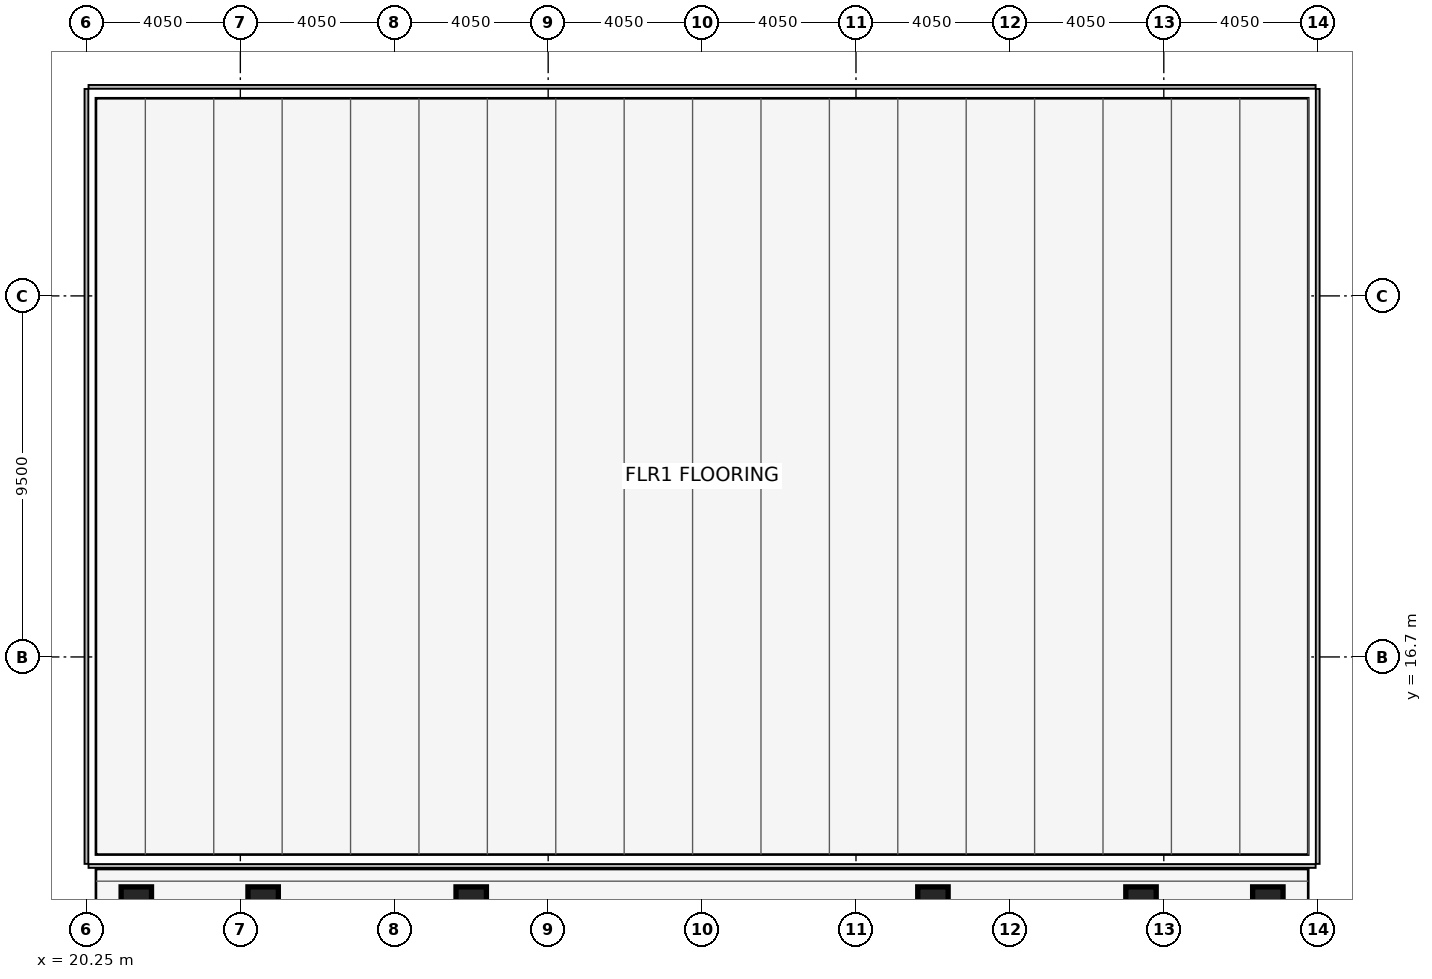
"""IFC4 building model, lengths in metres.
Left out: names, types, materials, properties, quantities, classifications, styles, units other than length and angle.
Written with IfcOpenShell. Run it as: python <this file> out.ifc"""

import sys

from ifc_helpers import new_model, si_unit, direction, frame, frame_2d, origin, origin_2d, place, context, subcontext, project, spatial, rectangle, hollow_rectangle, extrude, element, fill, save


model = new_model("IFC4")
c1 = context("Model", 3, precision=1e-05, world=origin(), true_north=direction((0.0, 1.0)))
c2 = subcontext(c1, "Body", "Model", "MODEL_VIEW")
j1 = project(units=[si_unit("LENGTHUNIT", "METRE"), si_unit("PLANEANGLEUNIT", "RADIAN")], contexts=[c1])
p1 = place(None, origin())
s1 = spatial("IfcSite", under=j1, at=p1, CompositionType="ELEMENT")
p2 = place(p1, origin())
s2 = spatial("IfcBuilding", under=s1, at=p2, CompositionType="ELEMENT")
p3 = place(p2, origin())
s3 = spatial("IfcBuildingStorey", under=s2, at=p3, CompositionType="ELEMENT", Elevation=0.0)
for number, where, z_axis, x_axis in (
    (1, (21.562, 10.15, 0.0), (0.0, 0.0, 1.0), (1.0, 0.0, 0.0)),
    (2, (24.9, 10.15, 0.0), (0.0, 0.0, 1.0), (1.0, 0.0, 0.0)),
    (3, (30.375, 10.15, 0.0), (0.0, 0.0, 1.0), (1.0, 0.0, 0.0)),
    (4, (42.525, 10.15, 0.0), (0.0, 0.0, 1.0), (1.0, 0.0, 0.0)),
    (5, (48.0, 10.15, 0.0), (0.0, 0.0, 1.0), (1.0, 0.0, 0.0)),
    (6, (51.337, 10.15, 0.0), (0.0, 0.0, 1.0), (1.0, 0.0, 0.0)),
):
    element("IfcColumn", number, at=place(p3, frame(where, z_axis=z_axis, x_axis=x_axis)), inside=s3, PredefinedType="COLUMN", context=c2, shape_type="SweptSolid", body=[
        extrude(hollow_rectangle(XDim=0.8, YDim=1.0, WallThickness=0.055, at=origin_2d()), origin(), (0.0, 0.0, 1.0), 5.4),
    ])
p4 = place(p3, frame((20.305, 11.2, 0.0), z_axis=(0.0, 0.0, 1.0), x_axis=(1.0, 0.0, 0.0)))
e7 = element("IfcWall", 7, at=p4, inside=s3, PredefinedType="MOVABLE", context=c2, shape_type="SweptSolid", body=[
    extrude(rectangle(XDim=32.29, YDim=0.1, at=frame_2d((16.145, 0.0))), origin(), (0.0, 0.0, 1.0), 4.29),
])
p5 = place(p4, frame((6.5, 0.0, 0.0)))
e8 = element("IfcOpeningElement", 8, at=p5, cuts=e7, PredefinedType="OPENING", context=c2, shape_type="SweptSolid", body=[
    extrude(rectangle(XDim=1.6, YDim=2.15, at=frame_2d((0.8, 1.075))), frame((0.0, 0.06, 0.0), z_axis=(0.0, -1.0, 0.0), x_axis=(1.0, 0.0, 0.0)), (0.0, 0.0, 1.0), 0.12),
])
p6 = place(p4, frame((15.4, 0.0, 0.0)))
e9 = element("IfcOpeningElement", 9, at=p6, cuts=e7, PredefinedType="OPENING", context=c2, shape_type="SweptSolid", body=[
    extrude(rectangle(XDim=1.6, YDim=2.15, at=frame_2d((0.8, 1.075))), frame((0.0, 0.06, 0.0), z_axis=(0.0, -1.0, 0.0), x_axis=(1.0, 0.0, 0.0)), (0.0, 0.0, 1.0), 0.12),
])
p7 = place(p4, frame((24.3, 0.0, 0.0)))
e10 = element("IfcOpeningElement", 10, at=p7, cuts=e7, PredefinedType="OPENING", context=c2, shape_type="SweptSolid", body=[
    extrude(rectangle(XDim=1.6, YDim=2.15, at=frame_2d((0.8, 1.075))), frame((0.0, 0.06, 0.0), z_axis=(0.0, -1.0, 0.0), x_axis=(1.0, 0.0, 0.0)), (0.0, 0.0, 1.0), 0.12),
])
p8 = place(p3, frame((20.305, 31.7, 0.0), z_axis=(0.0, 0.0, 1.0), x_axis=(1.0, 0.0, 0.0)))
e11 = element("IfcWall", 11, at=p8, inside=s3, PredefinedType="MOVABLE", context=c2, shape_type="SweptSolid", body=[
    extrude(rectangle(XDim=32.29, YDim=0.1, at=frame_2d((16.145, 0.0))), origin(), (0.0, 0.0, 1.0), 4.29),
])
p9 = place(p8, frame((7.2, 0.0, 0.0)))
e12 = element("IfcOpeningElement", 12, at=p9, cuts=e11, PredefinedType="OPENING", context=c2, shape_type="SweptSolid", body=[
    extrude(rectangle(XDim=1.6, YDim=2.15, at=frame_2d((0.8, 1.075))), frame((0.0, 0.06, 0.0), z_axis=(0.0, -1.0, 0.0), x_axis=(1.0, 0.0, 0.0)), (0.0, 0.0, 1.0), 0.12),
])
p10 = place(p8, frame((23.6, 0.0, 0.0)))
e13 = element("IfcOpeningElement", 13, at=p10, cuts=e11, PredefinedType="OPENING", context=c2, shape_type="SweptSolid", body=[
    extrude(rectangle(XDim=1.6, YDim=2.15, at=frame_2d((0.8, 1.075))), frame((0.0, 0.06, 0.0), z_axis=(0.0, -1.0, 0.0), x_axis=(1.0, 0.0, 0.0)), (0.0, 0.0, 1.0), 0.12),
])
for number, where, z_axis, x_axis in (
    (14, (20.25, 11.255, 0.0), (0.0, 0.0, 1.0), (0.0, 1.0, 0.0)),
    (15, (52.65, 11.255, 0.0), (0.0, 0.0, 1.0), (0.0, 1.0, 0.0)),
):
    element("IfcWall", number, at=place(p3, frame(where, z_axis=z_axis, x_axis=x_axis)), inside=s3, PredefinedType="MOVABLE", context=c2, shape_type="SweptSolid", body=[
        extrude(rectangle(XDim=20.39, YDim=0.1, at=frame_2d((10.195, 0.0))), origin(), (0.0, 0.0, 1.0), 4.59),
    ])
p11 = place(p5, origin())
e16 = element("IfcDoor", 16, at=p11, inside=s3, OperationType="DOUBLE_DOOR_SINGLE_SWING", PredefinedType="DOOR", context=c2, shape_type="SweptSolid", body=[
    extrude(rectangle(XDim=1.6, YDim=2.15, at=frame_2d((0.8, 1.075))), frame((0.0, 0.025, 0.0), z_axis=(0.0, -1.0, 0.0), x_axis=(1.0, 0.0, 0.0)), (0.0, 0.0, 1.0), 0.05),
])
fill(e8, e16)
p12 = place(p6, origin())
e17 = element("IfcDoor", 17, at=p12, inside=s3, OperationType="DOUBLE_DOOR_SINGLE_SWING", PredefinedType="DOOR", context=c2, shape_type="SweptSolid", body=[
    extrude(rectangle(XDim=1.6, YDim=2.15, at=frame_2d((0.8, 1.075))), frame((0.0, 0.025, 0.0), z_axis=(0.0, -1.0, 0.0), x_axis=(1.0, 0.0, 0.0)), (0.0, 0.0, 1.0), 0.05),
])
fill(e9, e17)
p13 = place(p7, origin())
e18 = element("IfcDoor", 18, at=p13, inside=s3, OperationType="DOUBLE_DOOR_SINGLE_SWING", PredefinedType="DOOR", context=c2, shape_type="SweptSolid", body=[
    extrude(rectangle(XDim=1.6, YDim=2.15, at=frame_2d((0.8, 1.075))), frame((0.0, 0.025, 0.0), z_axis=(0.0, -1.0, 0.0), x_axis=(1.0, 0.0, 0.0)), (0.0, 0.0, 1.0), 0.05),
])
fill(e10, e18)
p14 = place(p9, origin())
e19 = element("IfcDoor", 19, at=p14, inside=s3, OperationType="DOUBLE_DOOR_SINGLE_SWING", PredefinedType="DOOR", context=c2, shape_type="SweptSolid", body=[
    extrude(rectangle(XDim=1.6, YDim=2.15, at=frame_2d((0.8, 1.075))), frame((0.0, 0.025, 0.0), z_axis=(0.0, -1.0, 0.0), x_axis=(1.0, 0.0, 0.0)), (0.0, 0.0, 1.0), 0.05),
])
fill(e12, e19)
p15 = place(p10, origin())
e20 = element("IfcDoor", 20, at=p15, inside=s3, OperationType="DOUBLE_DOOR_SINGLE_SWING", PredefinedType="DOOR", context=c2, shape_type="SweptSolid", body=[
    extrude(rectangle(XDim=1.6, YDim=2.15, at=frame_2d((0.8, 1.075))), frame((0.0, 0.025, 0.0), z_axis=(0.0, -1.0, 0.0), x_axis=(1.0, 0.0, 0.0)), (0.0, 0.0, 1.0), 0.05),
])
fill(e13, e20)
save(model, sys.argv[1])
